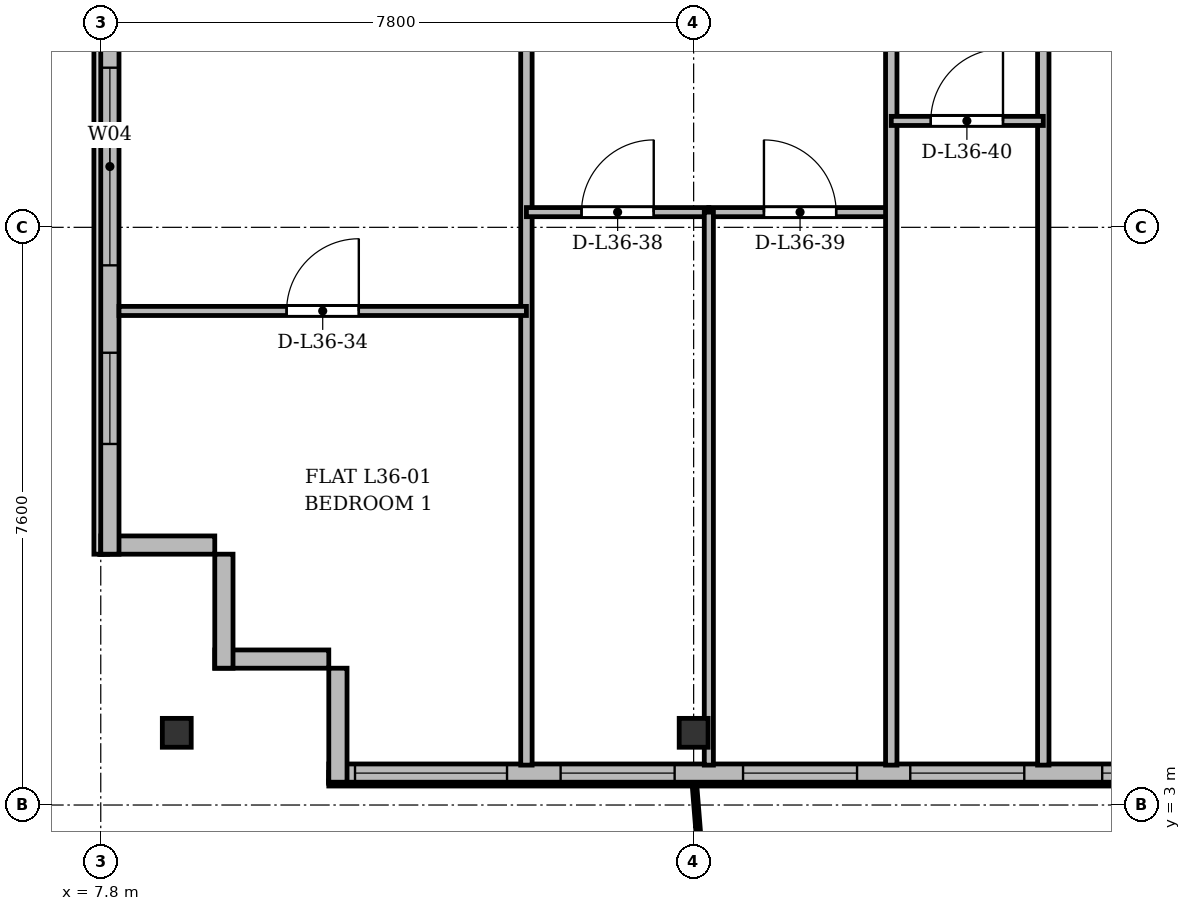
"""IFC4 building model, lengths in metres.
Left out: names, types, materials, properties, quantities, classifications, styles, units other than length and angle.
Written with IfcOpenShell. Run it as: python <this file> out.ifc"""

import sys

from ifc_helpers import new_model, si_unit, direction, frame, frame_2d, origin, origin_2d, place, context, subcontext, project, spatial, rectangle, i_section, extrude, source, transform, mapped, element, fill, save


model = new_model("IFC4")
c1 = context("Model", 3, precision=1e-05, world=origin(), true_north=direction((0.0, 1.0)))
c2 = subcontext(c1, "Body", "Model", "MODEL_VIEW")
j1 = project(units=[si_unit("LENGTHUNIT", "METRE"), si_unit("PLANEANGLEUNIT", "RADIAN")], contexts=[c1])
p1 = place(None, origin())
s1 = spatial("IfcSite", under=j1, at=p1, CompositionType="ELEMENT")
p2 = place(p1, origin())
s2 = spatial("IfcBuilding", under=s1, at=p2, CompositionType="ELEMENT")
p3 = place(p2, frame((0.0, 0.0, 139.3)))
s3 = spatial("IfcBuildingStorey", under=s2, at=p3, CompositionType="ELEMENT", Elevation=139.3)
m1 = source(origin(), c2, "Body", "SweptSolid", [
    extrude(i_section(OverallWidth=0.38, OverallDepth=0.38, WebThickness=0.02, FlangeThickness=0.03, at=origin_2d()), origin(), (0.0, 0.0, 1.0), 3.6),
])
for number, where, z_axis, x_axis in (
    (1, (8.8, 3.95, 0.0), (0.0, 0.0, 1.0), (1.0, 0.0, 0.0)),
    (2, (15.6, 3.95, 0.0), (0.0, 0.0, 1.0), (1.0, 0.0, 0.0)),
):
    element("IfcColumn", number, at=place(p3, frame(where, z_axis=z_axis, x_axis=x_axis)), inside=s3, PredefinedType="COLUMN", context=c2, shape_type="MappedRepresentation", body=[
        mapped(m1, transform((0.0, 0.0, 0.0), x_axis=(1.0, 0.0, 0.0), y_axis=(0.0, 1.0, 0.0), z_axis=(0.0, 0.0, 1.0), scale=1.0)),
    ])
for number, where, z_axis, x_axis in (
    (3, (10.8, 4.92, 0.0), (0.0, 0.0, 1.0), (-1.0, 0.0, 0.0)),
    (4, (9.42, 4.8, 0.0), (0.0, 0.0, 1.0), (0.0, 1.0, 0.0)),
):
    element("IfcWall", number, at=place(p3, frame(where, z_axis=z_axis, x_axis=x_axis)), inside=s3, PredefinedType="SOLIDWALL", context=c2, shape_type="SweptSolid", body=[
        extrude(rectangle(XDim=1.5, YDim=0.24, at=frame_2d((0.75, 0.0))), origin(), (0.0, 0.0, 1.0), 3.35),
    ])
p4 = place(p3, frame((9.3, 6.42, 0.0), z_axis=(0.0, 0.0, 1.0), x_axis=(-1.0, 0.0, 0.0)))
e5 = element("IfcWall", 5, at=p4, inside=s3, PredefinedType="SOLIDWALL", context=c2, shape_type="SweptSolid", body=[
    extrude(rectangle(XDim=1.5, YDim=0.24, at=frame_2d((0.75, 0.0))), origin(), (0.0, 0.0, 1.0), 2.85),
])
p5 = place(p3, frame((7.92, 6.3, 0.0), z_axis=(0.0, 0.0, 1.0), x_axis=(0.0, 1.0, 0.0)))
e6 = element("IfcWall", 6, at=p5, inside=s3, PredefinedType="SOLIDWALL", context=c2, shape_type="SweptSolid", body=[
    extrude(rectangle(XDim=39.2, YDim=0.24, at=frame_2d((19.6, 0.0))), origin(), (0.0, 0.0, 1.0), 3.35),
])
p6 = place(p5, frame((1.45, 0.0, 0.92)))
e7 = element("IfcOpeningElement", 7, at=p6, cuts=e6, PredefinedType="OPENING", context=c2, shape_type="SweptSolid", body=[
    extrude(rectangle(XDim=1.2, YDim=1.65, at=frame_2d((0.6, 0.825))), frame((0.0, 0.13, 0.0), z_axis=(0.0, -1.0, 0.0), x_axis=(1.0, 0.0, 0.0)), (0.0, 0.0, 1.0), 0.26),
])
p7 = place(p5, frame((3.8, 0.0, 0.92)))
e8 = element("IfcOpeningElement", 8, at=p7, cuts=e6, PredefinedType="OPENING", context=c2, shape_type="SweptSolid", body=[
    extrude(rectangle(XDim=2.6, YDim=1.9, at=frame_2d((1.3, 0.95))), frame((0.0, 0.13, 0.0), z_axis=(0.0, -1.0, 0.0), x_axis=(1.0, 0.0, 0.0)), (0.0, 0.0, 1.0), 0.26),
])
p8 = place(p5, frame((8.0, 0.0, 0.92)))
e9 = element("IfcOpeningElement", 9, at=p8, cuts=e6, PredefinedType="OPENING", context=c2, shape_type="SweptSolid", body=[
    extrude(rectangle(XDim=2.6, YDim=1.9, at=frame_2d((1.3, 0.95))), frame((0.0, 0.13, 0.0), z_axis=(0.0, -1.0, 0.0), x_axis=(1.0, 0.0, 0.0)), (0.0, 0.0, 1.0), 0.26),
])
p9 = place(p5, frame((15.2, 0.0, 0.92)))
e10 = element("IfcOpeningElement", 10, at=p9, cuts=e6, PredefinedType="OPENING", context=c2, shape_type="SweptSolid", body=[
    extrude(rectangle(XDim=2.6, YDim=1.9, at=frame_2d((1.3, 0.95))), frame((0.0, 0.13, 0.0), z_axis=(0.0, -1.0, 0.0), x_axis=(1.0, 0.0, 0.0)), (0.0, 0.0, 1.0), 0.26),
])
p10 = place(p5, frame((33.5, 0.0, 0.92)))
e11 = element("IfcOpeningElement", 11, at=p10, cuts=e6, PredefinedType="OPENING", context=c2, shape_type="SweptSolid", body=[
    extrude(rectangle(XDim=1.2, YDim=1.65, at=frame_2d((0.6, 0.825))), frame((0.0, 0.13, 0.0), z_axis=(0.0, -1.0, 0.0), x_axis=(1.0, 0.0, 0.0)), (0.0, 0.0, 1.0), 0.26),
])
p11 = place(p5, frame((36.85, 0.0, 0.92)))
e12 = element("IfcOpeningElement", 12, at=p11, cuts=e6, PredefinedType="OPENING", context=c2, shape_type="SweptSolid", body=[
    extrude(rectangle(XDim=1.2, YDim=1.65, at=frame_2d((0.6, 0.825))), frame((0.0, 0.13, 0.0), z_axis=(0.0, -1.0, 0.0), x_axis=(1.0, 0.0, 0.0)), (0.0, 0.0, 1.0), 0.26),
])
p12 = place(p3, frame((63.6, 3.42, 0.0), z_axis=(0.0, 0.0, 1.0), x_axis=(-1.0, 0.0, 0.0)))
e13 = element("IfcWall", 13, at=p12, inside=s3, PredefinedType="SOLIDWALL", context=c2, shape_type="SweptSolid", body=[
    extrude(rectangle(XDim=52.8, YDim=0.24, at=frame_2d((26.4, 0.0))), origin(), (0.0, 0.0, 1.0), 3.35),
])
p13 = place(p12, frame((0.495, 0.0, 0.9)))
e14 = element("IfcOpeningElement", 14, at=p13, cuts=e13, PredefinedType="OPENING", context=c2, shape_type="SweptSolid", body=[
    extrude(rectangle(XDim=1.5, YDim=1.75, at=frame_2d((0.75, 0.875))), frame((0.0, 0.13, 0.0), z_axis=(0.0, -1.0, 0.0), x_axis=(1.0, 0.0, 0.0)), (0.0, 0.0, 1.0), 0.26),
])
p14 = place(p12, frame((2.9, 0.0, 0.9)))
e15 = element("IfcOpeningElement", 15, at=p14, cuts=e13, PredefinedType="OPENING", context=c2, shape_type="SweptSolid", body=[
    extrude(rectangle(XDim=1.5, YDim=1.75, at=frame_2d((0.75, 0.875))), frame((0.0, 0.13, 0.0), z_axis=(0.0, -1.0, 0.0), x_axis=(1.0, 0.0, 0.0)), (0.0, 0.0, 1.0), 0.26),
])
p15 = place(p12, frame((5.902, 0.0, 0.0)))
e16 = element("IfcOpeningElement", 16, at=p15, cuts=e13, PredefinedType="OPENING", context=c2, shape_type="SweptSolid", body=[
    extrude(rectangle(XDim=1.2, YDim=2.2, at=frame_2d((0.6, 1.1))), frame((0.0, 0.13, 0.0), z_axis=(0.0, -1.0, 0.0), x_axis=(1.0, 0.0, 0.0)), (0.0, 0.0, 1.0), 0.26),
])
p16 = place(p12, frame((7.65, 0.0, 0.9)))
e17 = element("IfcOpeningElement", 17, at=p16, cuts=e13, PredefinedType="OPENING", context=c2, shape_type="SweptSolid", body=[
    extrude(rectangle(XDim=1.5, YDim=1.75, at=frame_2d((0.75, 0.875))), frame((0.0, 0.13, 0.0), z_axis=(0.0, -1.0, 0.0), x_axis=(1.0, 0.0, 0.0)), (0.0, 0.0, 1.0), 0.26),
])
p17 = place(p12, frame((10.1, 0.0, 0.9)))
e18 = element("IfcOpeningElement", 18, at=p17, cuts=e13, PredefinedType="OPENING", context=c2, shape_type="SweptSolid", body=[
    extrude(rectangle(XDim=1.8, YDim=1.8, at=frame_2d((0.9, 0.9))), frame((0.0, 0.13, 0.0), z_axis=(0.0, -1.0, 0.0), x_axis=(1.0, 0.0, 0.0)), (0.0, 0.0, 1.0), 0.26),
])
p18 = place(p12, frame((13.05, 0.0, 0.9)))
e19 = element("IfcOpeningElement", 19, at=p18, cuts=e13, PredefinedType="OPENING", context=c2, shape_type="SweptSolid", body=[
    extrude(rectangle(XDim=1.5, YDim=1.75, at=frame_2d((0.75, 0.875))), frame((0.0, 0.13, 0.0), z_axis=(0.0, -1.0, 0.0), x_axis=(1.0, 0.0, 0.0)), (0.0, 0.0, 1.0), 0.26),
])
p19 = place(p12, frame((15.45, 0.0, 0.9)))
e20 = element("IfcOpeningElement", 20, at=p19, cuts=e13, PredefinedType="OPENING", context=c2, shape_type="SweptSolid", body=[
    extrude(rectangle(XDim=1.5, YDim=1.75, at=frame_2d((0.75, 0.875))), frame((0.0, 0.13, 0.0), z_axis=(0.0, -1.0, 0.0), x_axis=(1.0, 0.0, 0.0)), (0.0, 0.0, 1.0), 0.26),
])
p20 = place(p12, frame((17.6, 0.0, 0.9)))
e21 = element("IfcOpeningElement", 21, at=p20, cuts=e13, PredefinedType="OPENING", context=c2, shape_type="SweptSolid", body=[
    extrude(rectangle(XDim=2.0, YDim=1.95, at=frame_2d((1.0, 0.975))), frame((0.0, 0.13, 0.0), z_axis=(0.0, -1.0, 0.0), x_axis=(1.0, 0.0, 0.0)), (0.0, 0.0, 1.0), 0.26),
])
p21 = place(p12, frame((20.625, 0.0, 0.9)))
e22 = element("IfcOpeningElement", 22, at=p21, cuts=e13, PredefinedType="OPENING", context=c2, shape_type="SweptSolid", body=[
    extrude(rectangle(XDim=1.65, YDim=1.85, at=frame_2d((0.825, 0.925))), frame((0.0, 0.13, 0.0), z_axis=(0.0, -1.0, 0.0), x_axis=(1.0, 0.0, 0.0)), (0.0, 0.0, 1.0), 0.26),
])
p22 = place(p12, frame((23.85, 0.0, 0.9)))
e23 = element("IfcOpeningElement", 23, at=p22, cuts=e13, PredefinedType="OPENING", context=c2, shape_type="SweptSolid", body=[
    extrude(rectangle(XDim=1.8, YDim=1.8, at=frame_2d((0.9, 0.9))), frame((0.0, 0.13, 0.0), z_axis=(0.0, -1.0, 0.0), x_axis=(1.0, 0.0, 0.0)), (0.0, 0.0, 1.0), 0.26),
])
p23 = place(p12, frame((28.6, 0.0, 0.9)))
e24 = element("IfcOpeningElement", 24, at=p23, cuts=e13, PredefinedType="OPENING", context=c2, shape_type="SweptSolid", body=[
    extrude(rectangle(XDim=2.2, YDim=1.8, at=frame_2d((1.1, 0.9))), frame((0.0, 0.13, 0.0), z_axis=(0.0, -1.0, 0.0), x_axis=(1.0, 0.0, 0.0)), (0.0, 0.0, 1.0), 0.26),
])
p24 = place(p12, frame((34.478, 0.0, 0.0)))
e25 = element("IfcOpeningElement", 25, at=p24, cuts=e13, PredefinedType="OPENING", context=c2, shape_type="SweptSolid", body=[
    extrude(rectangle(XDim=1.2, YDim=2.2, at=frame_2d((0.6, 1.1))), frame((0.0, 0.13, 0.0), z_axis=(0.0, -1.0, 0.0), x_axis=(1.0, 0.0, 0.0)), (0.0, 0.0, 1.0), 0.26),
])
p25 = place(p12, frame((37.4, 0.0, 0.9)))
e26 = element("IfcOpeningElement", 26, at=p25, cuts=e13, PredefinedType="OPENING", context=c2, shape_type="SweptSolid", body=[
    extrude(rectangle(XDim=2.0, YDim=1.95, at=frame_2d((1.0, 0.975))), frame((0.0, 0.13, 0.0), z_axis=(0.0, -1.0, 0.0), x_axis=(1.0, 0.0, 0.0)), (0.0, 0.0, 1.0), 0.26),
])
p26 = place(p12, frame((40.975, 0.0, 0.9)))
e27 = element("IfcOpeningElement", 27, at=p26, cuts=e13, PredefinedType="OPENING", context=c2, shape_type="SweptSolid", body=[
    extrude(rectangle(XDim=1.65, YDim=1.85, at=frame_2d((0.825, 0.925))), frame((0.0, 0.13, 0.0), z_axis=(0.0, -1.0, 0.0), x_axis=(1.0, 0.0, 0.0)), (0.0, 0.0, 1.0), 0.26),
])
p27 = place(p12, frame((43.65, 0.0, 0.9)))
e28 = element("IfcOpeningElement", 28, at=p27, cuts=e13, PredefinedType="OPENING", context=c2, shape_type="SweptSolid", body=[
    extrude(rectangle(XDim=1.5, YDim=1.75, at=frame_2d((0.75, 0.875))), frame((0.0, 0.13, 0.0), z_axis=(0.0, -1.0, 0.0), x_axis=(1.0, 0.0, 0.0)), (0.0, 0.0, 1.0), 0.26),
])
p28 = place(p12, frame((45.85, 0.0, 0.9)))
e29 = element("IfcOpeningElement", 29, at=p28, cuts=e13, PredefinedType="OPENING", context=c2, shape_type="SweptSolid", body=[
    extrude(rectangle(XDim=1.5, YDim=1.75, at=frame_2d((0.75, 0.875))), frame((0.0, 0.13, 0.0), z_axis=(0.0, -1.0, 0.0), x_axis=(1.0, 0.0, 0.0)), (0.0, 0.0, 1.0), 0.26),
])
p29 = place(p12, frame((48.25, 0.0, 0.9)))
e30 = element("IfcOpeningElement", 30, at=p29, cuts=e13, PredefinedType="OPENING", context=c2, shape_type="SweptSolid", body=[
    extrude(rectangle(XDim=1.5, YDim=1.75, at=frame_2d((0.75, 0.875))), frame((0.0, 0.13, 0.0), z_axis=(0.0, -1.0, 0.0), x_axis=(1.0, 0.0, 0.0)), (0.0, 0.0, 1.0), 0.26),
])
p30 = place(p12, frame((50.455, 0.0, 0.9)))
e31 = element("IfcOpeningElement", 31, at=p30, cuts=e13, PredefinedType="OPENING", context=c2, shape_type="SweptSolid", body=[
    extrude(rectangle(XDim=2.0, YDim=1.95, at=frame_2d((1.0, 0.975))), frame((0.0, 0.13, 0.0), z_axis=(0.0, -1.0, 0.0), x_axis=(1.0, 0.0, 0.0)), (0.0, 0.0, 1.0), 0.26),
])
p31 = place(p3, frame((10.92, 3.3, 0.0), z_axis=(0.0, 0.0, 1.0), x_axis=(0.0, 1.0, 0.0)))
e32 = element("IfcWall", 32, at=p31, inside=s3, PredefinedType="SOLIDWALL", context=c2, shape_type="SweptSolid", body=[
    extrude(rectangle(XDim=1.5, YDim=0.24, at=frame_2d((0.75, 0.0))), origin(), (0.0, 0.0, 1.0), 2.75),
])
p32 = place(p3, frame((13.4, 3.525, 0.0), z_axis=(0.0, 0.0, 1.0), x_axis=(0.0, 1.0, 0.0)))
e33 = element("IfcWall", 33, at=p32, inside=s3, PredefinedType="PARTITIONING", context=c2, shape_type="SweptSolid", body=[
    extrude(rectangle(XDim=27.275, YDim=0.15, at=frame_2d((13.638, 0.0))), origin(), (0.0, 0.0, 1.0), 2.75),
])
p33 = place(p3, frame((8.04, 9.5, 0.0), z_axis=(0.0, 0.0, 1.0), x_axis=(1.0, 0.0, 0.0)))
e34 = element("IfcWall", 34, at=p33, inside=s3, PredefinedType="PARTITIONING", context=c2, shape_type="SweptSolid", body=[
    extrude(rectangle(XDim=5.36, YDim=0.12, at=frame_2d((2.68, 0.0))), origin(), (0.0, 0.0, 1.0), 2.85),
])
p34 = place(p33, frame((2.205, 0.0, 0.0)))
e35 = element("IfcOpeningElement", 35, at=p34, cuts=e34, PredefinedType="OPENING", context=c2, shape_type="SweptSolid", body=[
    extrude(rectangle(XDim=0.95, YDim=2.15, at=frame_2d((0.475, 1.075))), frame((0.0, 0.07, 0.0), z_axis=(0.0, -1.0, 0.0), x_axis=(1.0, 0.0, 0.0)), (0.0, 0.0, 1.0), 0.14),
])
p35 = place(p3, frame((13.4, 10.8, 0.0), z_axis=(0.0, 0.0, 1.0), x_axis=(1.0, 0.0, 0.0)))
e36 = element("IfcWall", 36, at=p35, inside=s3, PredefinedType="PARTITIONING", context=c2, shape_type="SweptSolid", body=[
    extrude(rectangle(XDim=2.4, YDim=0.12, at=frame_2d((1.2, 0.0))), origin(), (0.0, 0.0, 1.0), 2.85),
])
p36 = place(p35, frame((0.725, 0.0, 0.0)))
e37 = element("IfcOpeningElement", 37, at=p36, cuts=e36, PredefinedType="OPENING", context=c2, shape_type="SweptSolid", body=[
    extrude(rectangle(XDim=0.95, YDim=2.15, at=frame_2d((0.475, 1.075))), frame((0.0, 0.07, 0.0), z_axis=(0.0, -1.0, 0.0), x_axis=(1.0, 0.0, 0.0)), (0.0, 0.0, 1.0), 0.14),
])
p37 = place(p3, frame((15.8, 10.8, 0.0), z_axis=(0.0, 0.0, 1.0), x_axis=(1.0, 0.0, 0.0)))
e38 = element("IfcWall", 38, at=p37, inside=s3, PredefinedType="PARTITIONING", context=c2, shape_type="SweptSolid", body=[
    extrude(rectangle(XDim=2.4, YDim=0.12, at=frame_2d((1.2, 0.0))), origin(), (0.0, 0.0, 1.0), 3.0),
])
p38 = place(p37, frame((0.725, 0.0, 0.0)))
e39 = element("IfcOpeningElement", 39, at=p38, cuts=e38, PredefinedType="OPENING", context=c2, shape_type="SweptSolid", body=[
    extrude(rectangle(XDim=0.95, YDim=2.15, at=frame_2d((0.475, 1.075))), frame((0.0, 0.07, 0.0), z_axis=(0.0, -1.0, 0.0), x_axis=(1.0, 0.0, 0.0)), (0.0, 0.0, 1.0), 0.14),
])
p39 = place(p3, frame((15.8, 3.525, 0.0), z_axis=(0.0, 0.0, 1.0), x_axis=(0.0, 1.0, 0.0)))
e40 = element("IfcWall", 40, at=p39, inside=s3, PredefinedType="PARTITIONING", context=c2, shape_type="SweptSolid", body=[
    extrude(rectangle(XDim=7.275, YDim=0.12, at=frame_2d((3.638, 0.0))), origin(), (0.0, 0.0, 1.0), 2.75),
])
for number, where, z_axis, x_axis in (
    (41, (18.2, 3.525, 0.0), (0.0, 0.0, 1.0), (0.0, 1.0, 0.0)),
    (42, (20.2, 3.525, 0.0), (0.0, 0.0, 1.0), (0.0, 1.0, 0.0)),
):
    element("IfcWall", number, at=place(p3, frame(where, z_axis=z_axis, x_axis=x_axis)), inside=s3, PredefinedType="PARTITIONING", context=c2, shape_type="SweptSolid", body=[
        extrude(rectangle(XDim=27.275, YDim=0.15, at=frame_2d((13.638, 0.0))), origin(), (0.0, 0.0, 1.0), 2.75),
    ])
p40 = place(p3, frame((18.2, 12.0, 0.0), z_axis=(0.0, 0.0, 1.0), x_axis=(1.0, 0.0, 0.0)))
e43 = element("IfcWall", 43, at=p40, inside=s3, PredefinedType="PARTITIONING", context=c2, shape_type="SweptSolid", body=[
    extrude(rectangle(XDim=2.0, YDim=0.12, at=frame_2d((1.0, 0.0))), origin(), (0.0, 0.0, 1.0), 3.35),
])
p41 = place(p40, frame((0.52, 0.0, 0.0)))
e44 = element("IfcOpeningElement", 44, at=p41, cuts=e43, PredefinedType="OPENING", context=c2, shape_type="SweptSolid", body=[
    extrude(rectangle(XDim=0.95, YDim=2.15, at=frame_2d((0.475, 1.075))), frame((0.0, 0.07, 0.0), z_axis=(0.0, -1.0, 0.0), x_axis=(1.0, 0.0, 0.0)), (0.0, 0.0, 1.0), 0.14),
])
m2 = source(origin(), c2, "Body", "SweptSolid", [
    extrude(rectangle(XDim=1.2, YDim=1.65, at=frame_2d((0.6, 0.825))), frame((0.0, 0.03, 0.0), z_axis=(0.0, -1.0, 0.0), x_axis=(1.0, 0.0, 0.0)), (0.0, 0.0, 1.0), 0.06),
])
p42 = place(p6, origin())
e45 = element("IfcWindow", 45, at=p42, inside=s3, PartitioningType="SINGLE_PANEL", PredefinedType="WINDOW", context=c2, shape_type="MappedRepresentation", body=[
    mapped(m2, transform((0.0, 0.0, 0.0), x_axis=(1.0, 0.0, 0.0), y_axis=(0.0, 1.0, 0.0), z_axis=(0.0, 0.0, 1.0), scale=1.0)),
])
fill(e7, e45)
m3 = source(origin(), c2, "Body", "SweptSolid", [
    extrude(rectangle(XDim=2.6, YDim=1.9, at=frame_2d((1.3, 0.95))), frame((0.0, 0.03, 0.0), z_axis=(0.0, -1.0, 0.0), x_axis=(1.0, 0.0, 0.0)), (0.0, 0.0, 1.0), 0.06),
])
p43 = place(p7, origin())
e46 = element("IfcWindow", 46, at=p43, inside=s3, PartitioningType="SINGLE_PANEL", PredefinedType="WINDOW", context=c2, shape_type="MappedRepresentation", body=[
    mapped(m3, transform((0.0, 0.0, 0.0), x_axis=(1.0, 0.0, 0.0), y_axis=(0.0, 1.0, 0.0), z_axis=(0.0, 0.0, 1.0), scale=1.0)),
])
fill(e8, e46)
m4 = source(origin(), c2, "Body", "SweptSolid", [
    extrude(rectangle(XDim=1.65, YDim=1.85, at=frame_2d((0.825, 0.925))), frame((0.0, 0.03, 0.0), z_axis=(0.0, -1.0, 0.0), x_axis=(1.0, 0.0, 0.0)), (0.0, 0.0, 1.0), 0.06),
])
p44 = place(p26, origin())
e47 = element("IfcWindow", 47, at=p44, inside=s3, PartitioningType="SINGLE_PANEL", PredefinedType="WINDOW", context=c2, shape_type="MappedRepresentation", body=[
    mapped(m4, transform((0.0, 0.0, 0.0), x_axis=(1.0, 0.0, 0.0), y_axis=(0.0, 1.0, 0.0), z_axis=(0.0, 0.0, 1.0), scale=1.0)),
])
fill(e27, e47)
m5 = source(origin(), c2, "Body", "SweptSolid", [
    extrude(rectangle(XDim=1.5, YDim=1.75, at=frame_2d((0.75, 0.875))), frame((0.0, 0.03, 0.0), z_axis=(0.0, -1.0, 0.0), x_axis=(1.0, 0.0, 0.0)), (0.0, 0.0, 1.0), 0.06),
])
p45 = place(p27, origin())
e48 = element("IfcWindow", 48, at=p45, inside=s3, PartitioningType="SINGLE_PANEL", PredefinedType="WINDOW", context=c2, shape_type="MappedRepresentation", body=[
    mapped(m5, transform((0.0, 0.0, 0.0), x_axis=(1.0, 0.0, 0.0), y_axis=(0.0, 1.0, 0.0), z_axis=(0.0, 0.0, 1.0), scale=1.0)),
])
fill(e28, e48)
p46 = place(p28, origin())
e49 = element("IfcWindow", 49, at=p46, inside=s3, PartitioningType="SINGLE_PANEL", PredefinedType="WINDOW", context=c2, shape_type="MappedRepresentation", body=[
    mapped(m5, transform((0.0, 0.0, 0.0), x_axis=(1.0, 0.0, 0.0), y_axis=(0.0, 1.0, 0.0), z_axis=(0.0, 0.0, 1.0), scale=1.0)),
])
fill(e29, e49)
p47 = place(p29, origin())
e50 = element("IfcWindow", 50, at=p47, inside=s3, PartitioningType="SINGLE_PANEL", PredefinedType="WINDOW", context=c2, shape_type="MappedRepresentation", body=[
    mapped(m5, transform((0.0, 0.0, 0.0), x_axis=(1.0, 0.0, 0.0), y_axis=(0.0, 1.0, 0.0), z_axis=(0.0, 0.0, 1.0), scale=1.0)),
])
fill(e30, e50)
m6 = source(origin(), c2, "Body", "SweptSolid", [
    extrude(rectangle(XDim=2.0, YDim=1.95, at=frame_2d((1.0, 0.975))), frame((0.0, 0.03, 0.0), z_axis=(0.0, -1.0, 0.0), x_axis=(1.0, 0.0, 0.0)), (0.0, 0.0, 1.0), 0.06),
])
p48 = place(p30, origin())
e51 = element("IfcWindow", 51, at=p48, inside=s3, PartitioningType="SINGLE_PANEL", PredefinedType="WINDOW", context=c2, shape_type="MappedRepresentation", body=[
    mapped(m6, transform((0.0, 0.0, 0.0), x_axis=(1.0, 0.0, 0.0), y_axis=(0.0, 1.0, 0.0), z_axis=(0.0, 0.0, 1.0), scale=1.0)),
])
fill(e31, e51)
m7 = source(origin(), c2, "Body", "SweptSolid", [
    extrude(rectangle(XDim=0.95, YDim=2.15, at=frame_2d((0.475, 1.075))), frame((0.0, 0.025, 0.0), z_axis=(0.0, -1.0, 0.0), x_axis=(1.0, 0.0, 0.0)), (0.0, 0.0, 1.0), 0.05),
])
p49 = place(p34, origin())
e52 = element("IfcDoor", 52, at=p49, inside=s3, OperationType="SINGLE_SWING_RIGHT", PredefinedType="DOOR", context=c2, shape_type="MappedRepresentation", body=[
    mapped(m7, transform((0.0, 0.0, 0.0), x_axis=(1.0, 0.0, 0.0), y_axis=(0.0, 1.0, 0.0), z_axis=(0.0, 0.0, 1.0), scale=1.0)),
])
fill(e35, e52)
p50 = place(p36, origin())
e53 = element("IfcDoor", 53, at=p50, inside=s3, OperationType="SINGLE_SWING_RIGHT", PredefinedType="DOOR", context=c2, shape_type="MappedRepresentation", body=[
    mapped(m7, transform((0.0, 0.0, 0.0), x_axis=(1.0, 0.0, 0.0), y_axis=(0.0, 1.0, 0.0), z_axis=(0.0, 0.0, 1.0), scale=1.0)),
])
fill(e37, e53)
p51 = place(p38, origin())
e54 = element("IfcDoor", 54, at=p51, inside=s3, OperationType="SINGLE_SWING_LEFT", PredefinedType="DOOR", context=c2, shape_type="MappedRepresentation", body=[
    mapped(m7, transform((0.0, 0.0, 0.0), x_axis=(1.0, 0.0, 0.0), y_axis=(0.0, 1.0, 0.0), z_axis=(0.0, 0.0, 1.0), scale=1.0)),
])
fill(e39, e54)
p52 = place(p41, origin())
e55 = element("IfcDoor", 55, at=p52, inside=s3, OperationType="SINGLE_SWING_RIGHT", PredefinedType="DOOR", context=c2, shape_type="MappedRepresentation", body=[
    mapped(m7, transform((0.0, 0.0, 0.0), x_axis=(1.0, 0.0, 0.0), y_axis=(0.0, 1.0, 0.0), z_axis=(0.0, 0.0, 1.0), scale=1.0)),
])
fill(e44, e55)
save(model, sys.argv[1])
